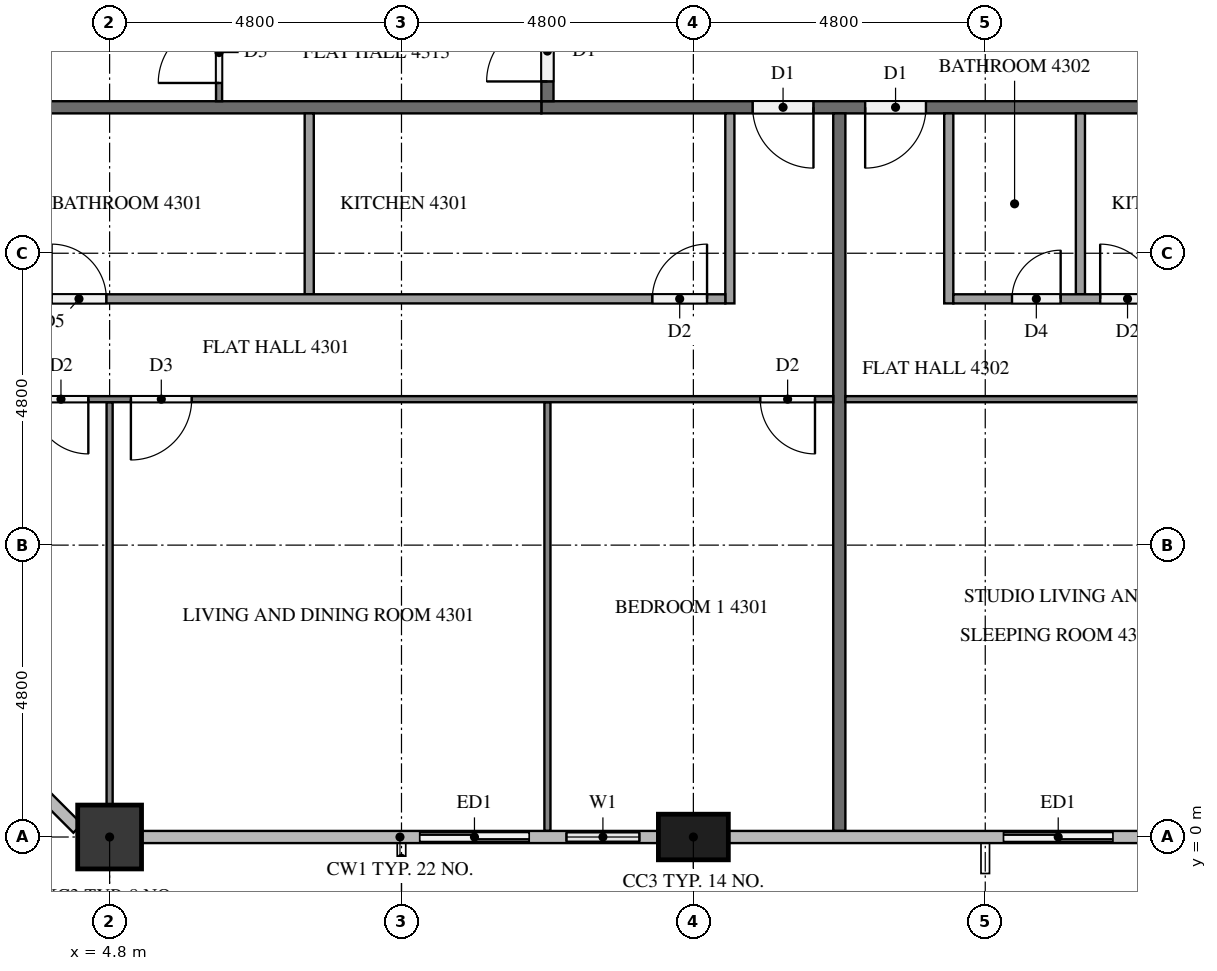
"""IFC4 building model, lengths in metres.
Left out: names, types, materials, properties, quantities, classifications, styles, units other than length and angle.
Written with IfcOpenShell. Run it as: python <this file> out.ifc"""

import sys

from ifc_helpers import new_model, si_unit, direction, frame, frame_2d, origin, origin_2d, place, context, subcontext, project, spatial, rectangle, extrude, element, fill, save


model = new_model("IFC4")
c1 = context("Model", 3, precision=1e-05, world=origin(), true_north=direction((0.0, 1.0)))
c2 = subcontext(c1, "Body", "Model", "MODEL_VIEW")
j1 = project(units=[si_unit("LENGTHUNIT", "METRE"), si_unit("PLANEANGLEUNIT", "RADIAN")], contexts=[c1])
p1 = place(None, origin())
s1 = spatial("IfcSite", under=j1, at=p1, CompositionType="ELEMENT")
p2 = place(p1, origin())
s2 = spatial("IfcBuilding", under=s1, at=p2, CompositionType="ELEMENT")
p3 = place(p2, frame((0.0, 0.0, 166.5)))
s3 = spatial("IfcBuildingStorey", under=s2, at=p3, CompositionType="ELEMENT", Elevation=166.5)
p4 = place(p3, frame((4.8, 0.0, 0.0), z_axis=(0.0, 0.0, 1.0), x_axis=(1.0, 0.0, 0.0)))
e1 = element("IfcColumn", 1, at=p4, inside=s3, PredefinedType="COLUMN", context=c2, shape_type="SweptSolid", body=[
    extrude(rectangle(XDim=1.05, YDim=1.05, at=origin_2d()), origin(), (0.0, 0.0, 1.0), 3.2),
])
p5 = place(p3, frame((14.4, 0.0, 0.0), z_axis=(0.0, 0.0, 1.0), x_axis=(1.0, 0.0, 0.0)))
e2 = element("IfcColumn", 2, at=p5, inside=s3, PredefinedType="COLUMN", context=c2, shape_type="SweptSolid", body=[
    extrude(rectangle(XDim=1.15, YDim=0.75, at=origin_2d()), origin(), (0.0, 0.0, 1.0), 3.2),
])
p6 = place(p3, frame((9.6, 0.0, 0.0), z_axis=(0.0, 0.0, 1.0), x_axis=(1.0, 0.0, 0.0)))
e3 = element("IfcWall", 3, at=p6, inside=s3, PredefinedType="SOLIDWALL", context=c2, shape_type="SweptSolid", body=[
    extrude(rectangle(XDim=4.225, YDim=0.15, at=frame_2d((2.112, 0.0))), origin(), (0.0, 0.0, 1.0), 3.2),
])
p7 = place(p6, frame((0.3, 0.0, 0.0)))
e4 = element("IfcOpeningElement", 4, at=p7, cuts=e3, PredefinedType="OPENING", context=c2, shape_type="SweptSolid", body=[
    extrude(rectangle(XDim=1.8, YDim=2.4, at=frame_2d((0.9, 1.2))), frame((0.0, 0.085, 0.0), z_axis=(0.0, -1.0, 0.0), x_axis=(1.0, 0.0, 0.0)), (0.0, 0.0, 1.0), 0.17),
])
p8 = place(p6, frame((2.712, 0.0, 0.9)))
e5 = element("IfcOpeningElement", 5, at=p8, cuts=e3, PredefinedType="OPENING", context=c2, shape_type="SweptSolid", body=[
    extrude(rectangle(XDim=1.2, YDim=1.4, at=frame_2d((0.6, 0.7))), frame((0.0, 0.085, 0.0), z_axis=(0.0, -1.0, 0.0), x_axis=(1.0, 0.0, 0.0)), (0.0, 0.0, 1.0), 0.17),
])
p9 = place(p3, frame((19.2, 0.0, 0.0), z_axis=(0.0, 0.0, 1.0), x_axis=(1.0, 0.0, 0.0)))
e6 = element("IfcWall", 6, at=p9, inside=s3, PredefinedType="SOLIDWALL", context=c2, shape_type="SweptSolid", body=[
    extrude(rectangle(XDim=2.4, YDim=0.15, at=frame_2d((1.2, 0.0))), origin(), (0.0, 0.0, 1.0), 3.2),
])
p10 = place(p9, frame((0.3, 0.0, 0.0)))
e7 = element("IfcOpeningElement", 7, at=p10, cuts=e6, PredefinedType="OPENING", context=c2, shape_type="SweptSolid", body=[
    extrude(rectangle(XDim=1.8, YDim=2.4, at=frame_2d((0.9, 1.2))), frame((0.0, 0.085, 0.0), z_axis=(0.0, -1.0, 0.0), x_axis=(1.0, 0.0, 0.0)), (0.0, 0.0, 1.0), 0.17),
])
p11 = place(p3, frame((50.5, 12.0, 0.0), z_axis=(0.0, 0.0, 1.0), x_axis=(-1.0, 0.0, 0.0)))
e8 = element("IfcWall", 8, at=p11, inside=s3, PredefinedType="PARTITIONING", context=c2, shape_type="SweptSolid", body=[
    extrude(rectangle(XDim=38.6, YDim=0.2, at=frame_2d((19.3, 0.0))), origin(), (0.0, 0.0, 1.0), 3.2),
])
p12 = place(p11, frame((34.125, 0.0, 0.0)))
e9 = element("IfcOpeningElement", 9, at=p12, cuts=e8, PredefinedType="OPENING", context=c2, shape_type="SweptSolid", body=[
    extrude(rectangle(XDim=1.0, YDim=2.1, at=frame_2d((0.5, 1.05))), frame((0.0, 0.11, 0.0), z_axis=(0.0, -1.0, 0.0), x_axis=(1.0, 0.0, 0.0)), (0.0, 0.0, 1.0), 0.22),
])
p13 = place(p11, frame((32.275, 0.0, 0.0)))
e10 = element("IfcOpeningElement", 10, at=p13, cuts=e8, PredefinedType="OPENING", context=c2, shape_type="SweptSolid", body=[
    extrude(rectangle(XDim=1.0, YDim=2.1, at=frame_2d((0.5, 1.05))), frame((0.0, 0.11, 0.0), z_axis=(0.0, -1.0, 0.0), x_axis=(1.0, 0.0, 0.0)), (0.0, 0.0, 1.0), 0.22),
])
p14 = place(p11, frame((12.525, 0.0, 0.0)))
e11 = element("IfcOpeningElement", 11, at=p14, cuts=e8, PredefinedType="OPENING", context=c2, shape_type="SweptSolid", body=[
    extrude(rectangle(XDim=1.0, YDim=2.1, at=frame_2d((0.5, 1.05))), frame((0.0, 0.11, 0.0), z_axis=(0.0, -1.0, 0.0), x_axis=(1.0, 0.0, 0.0)), (0.0, 0.0, 1.0), 0.22),
])
p15 = place(p11, frame((10.625, 0.0, 0.0)))
e12 = element("IfcOpeningElement", 12, at=p15, cuts=e8, PredefinedType="OPENING", context=c2, shape_type="SweptSolid", body=[
    extrude(rectangle(XDim=1.1, YDim=2.1, at=frame_2d((0.55, 1.05))), frame((0.0, 0.11, 0.0), z_axis=(0.0, -1.0, 0.0), x_axis=(1.0, 0.0, 0.0)), (0.0, 0.0, 1.0), 0.22),
])
p16 = place(p3, frame((12.0, 12.1, 0.0), z_axis=(0.0, 0.0, 1.0), x_axis=(0.0, 1.0, 0.0)))
e13 = element("IfcWall", 13, at=p16, inside=s3, PredefinedType="PARTITIONING", context=c2, shape_type="SweptSolid", body=[
    extrude(rectangle(XDim=28.6, YDim=0.2, at=frame_2d((14.3, 0.0))), origin(), (0.0, 0.0, 1.0), 3.2),
])
p17 = place(p16, frame((24.325, 0.0, 0.0)))
e14 = element("IfcOpeningElement", 14, at=p17, cuts=e13, PredefinedType="OPENING", context=c2, shape_type="SweptSolid", body=[
    extrude(rectangle(XDim=1.0, YDim=2.1, at=frame_2d((0.5, 1.05))), frame((0.0, 0.11, 0.0), z_axis=(0.0, -1.0, 0.0), x_axis=(1.0, 0.0, 0.0)), (0.0, 0.0, 1.0), 0.22),
])
p18 = place(p16, frame((22.475, 0.0, 0.0)))
e15 = element("IfcOpeningElement", 15, at=p18, cuts=e13, PredefinedType="OPENING", context=c2, shape_type="SweptSolid", body=[
    extrude(rectangle(XDim=1.0, YDim=2.1, at=frame_2d((0.5, 1.05))), frame((0.0, 0.11, 0.0), z_axis=(0.0, -1.0, 0.0), x_axis=(1.0, 0.0, 0.0)), (0.0, 0.0, 1.0), 0.22),
])
p19 = place(p16, frame((0.325, 0.0, 0.0)))
e16 = element("IfcOpeningElement", 16, at=p19, cuts=e13, PredefinedType="OPENING", context=c2, shape_type="SweptSolid", body=[
    extrude(rectangle(XDim=1.0, YDim=2.1, at=frame_2d((0.5, 1.05))), frame((0.0, 0.11, 0.0), z_axis=(0.0, -1.0, 0.0), x_axis=(1.0, 0.0, 0.0)), (0.0, 0.0, 1.0), 0.22),
])
for number, where, z_axis, x_axis in (
    (17, (16.8, 11.9, 0.0), (0.0, 0.0, 1.0), (0.0, -1.0, 0.0)),
    (18, (0.1, 12.0, 0.0), (0.0, 0.0, 1.0), (1.0, 0.0, 0.0)),
):
    element("IfcWall", number, at=place(p3, frame(where, z_axis=z_axis, x_axis=x_axis)), inside=s3, PredefinedType="PARTITIONING", context=c2, shape_type="SweptSolid", body=[
        extrude(rectangle(XDim=11.8, YDim=0.2, at=frame_2d((5.9, 0.0))), origin(), (0.0, 0.0, 1.0), 3.2),
    ])
p20 = place(p3, frame((12.0, 7.15, 0.0), z_axis=(0.0, 0.0, 1.0), x_axis=(0.0, -1.0, 0.0)))
e19 = element("IfcWall", 19, at=p20, inside=s3, PredefinedType="PARTITIONING", context=c2, shape_type="SweptSolid", body=[
    extrude(rectangle(XDim=7.05, YDim=0.1, at=frame_2d((3.525, 0.0))), origin(), (0.0, 0.0, 1.0), 3.2),
])
p21 = place(p3, frame((4.8, 7.15, 0.0), z_axis=(0.0, 0.0, 1.0), x_axis=(0.0, -1.0, 0.0)))
e20 = element("IfcWall", 20, at=p21, inside=s3, PredefinedType="PARTITIONING", context=c2, shape_type="SweptSolid", body=[
    extrude(rectangle(XDim=6.625, YDim=0.1, at=frame_2d((3.312, 0.0))), origin(), (0.0, 0.0, 1.0), 3.2),
])
p22 = place(p3, frame((16.7, 7.2, 0.0), z_axis=(0.0, 0.0, 1.0), x_axis=(-1.0, 0.0, 0.0)))
e21 = element("IfcWall", 21, at=p22, inside=s3, PredefinedType="PARTITIONING", context=c2, shape_type="SweptSolid", body=[
    extrude(rectangle(XDim=16.6, YDim=0.1, at=frame_2d((8.3, 0.0))), origin(), (0.0, 0.0, 1.0), 3.2),
])
p23 = place(p22, frame((0.3, 0.0, 0.0)))
e22 = element("IfcOpeningElement", 22, at=p23, cuts=e21, PredefinedType="OPENING", context=c2, shape_type="SweptSolid", body=[
    extrude(rectangle(XDim=0.9, YDim=2.1, at=frame_2d((0.45, 1.05))), frame((0.0, 0.06, 0.0), z_axis=(0.0, -1.0, 0.0), x_axis=(1.0, 0.0, 0.0)), (0.0, 0.0, 1.0), 0.12),
])
p24 = place(p22, frame((10.55, 0.0, 0.0)))
e23 = element("IfcOpeningElement", 23, at=p24, cuts=e21, PredefinedType="OPENING", context=c2, shape_type="SweptSolid", body=[
    extrude(rectangle(XDim=1.0, YDim=2.1, at=frame_2d((0.5, 1.05))), frame((0.0, 0.06, 0.0), z_axis=(0.0, -1.0, 0.0), x_axis=(1.0, 0.0, 0.0)), (0.0, 0.0, 1.0), 0.12),
])
p25 = place(p22, frame((12.25, 0.0, 0.0)))
e24 = element("IfcOpeningElement", 24, at=p25, cuts=e21, PredefinedType="OPENING", context=c2, shape_type="SweptSolid", body=[
    extrude(rectangle(XDim=0.9, YDim=2.1, at=frame_2d((0.45, 1.05))), frame((0.0, 0.06, 0.0), z_axis=(0.0, -1.0, 0.0), x_axis=(1.0, 0.0, 0.0)), (0.0, 0.0, 1.0), 0.12),
])
p26 = place(p3, frame((8.083, 11.9, 0.0), z_axis=(0.0, 0.0, 1.0), x_axis=(0.0, -1.0, 0.0)))
e25 = element("IfcWall", 25, at=p26, inside=s3, PredefinedType="PARTITIONING", context=c2, shape_type="SweptSolid", body=[
    extrude(rectangle(XDim=2.975, YDim=0.15, at=frame_2d((1.487, 0.0))), origin(), (0.0, 0.0, 1.0), 3.2),
])
p27 = place(p3, frame((15.0, 11.9, 0.0), z_axis=(0.0, 0.0, 1.0), x_axis=(0.0, -1.0, 0.0)))
e26 = element("IfcWall", 26, at=p27, inside=s3, PredefinedType="PARTITIONING", context=c2, shape_type="SweptSolid", body=[
    extrude(rectangle(XDim=3.125, YDim=0.15, at=frame_2d((1.562, 0.0))), origin(), (0.0, 0.0, 1.0), 3.2),
])
p28 = place(p3, frame((0.1, 8.85, 0.0), z_axis=(0.0, 0.0, 1.0), x_axis=(1.0, 0.0, 0.0)))
e27 = element("IfcWall", 27, at=p28, inside=s3, PredefinedType="PARTITIONING", context=c2, shape_type="SweptSolid", body=[
    extrude(rectangle(XDim=14.825, YDim=0.15, at=frame_2d((7.413, 0.0))), origin(), (0.0, 0.0, 1.0), 3.2),
])
p29 = place(p28, frame((13.625, 0.0, 0.0)))
e28 = element("IfcOpeningElement", 28, at=p29, cuts=e27, PredefinedType="OPENING", context=c2, shape_type="SweptSolid", body=[
    extrude(rectangle(XDim=0.9, YDim=2.1, at=frame_2d((0.45, 1.05))), frame((0.0, 0.085, 0.0), z_axis=(0.0, -1.0, 0.0), x_axis=(1.0, 0.0, 0.0)), (0.0, 0.0, 1.0), 0.17),
])
p30 = place(p28, frame((3.746, 0.0, 0.0)))
e29 = element("IfcOpeningElement", 29, at=p30, cuts=e27, PredefinedType="OPENING", context=c2, shape_type="SweptSolid", body=[
    extrude(rectangle(XDim=0.9, YDim=2.1, at=frame_2d((0.45, 1.05))), frame((0.0, 0.085, 0.0), z_axis=(0.0, -1.0, 0.0), x_axis=(1.0, 0.0, 0.0)), (0.0, 0.0, 1.0), 0.17),
])
p31 = place(p28, frame((2.296, 0.0, 0.0)))
e30 = element("IfcOpeningElement", 30, at=p31, cuts=e27, PredefinedType="OPENING", context=c2, shape_type="SweptSolid", body=[
    extrude(rectangle(XDim=0.8, YDim=2.1, at=frame_2d((0.4, 1.05))), frame((0.0, 0.085, 0.0), z_axis=(0.0, -1.0, 0.0), x_axis=(1.0, 0.0, 0.0)), (0.0, 0.0, 1.0), 0.17),
])
p32 = place(p3, frame((23.9, 7.2, 0.0), z_axis=(0.0, 0.0, 1.0), x_axis=(-1.0, 0.0, 0.0)))
e31 = element("IfcWall", 31, at=p32, inside=s3, PredefinedType="PARTITIONING", context=c2, shape_type="SweptSolid", body=[
    extrude(rectangle(XDim=7.0, YDim=0.1, at=frame_2d((3.5, 0.0))), origin(), (0.0, 0.0, 1.0), 3.2),
])
p33 = place(p32, frame((0.3, 0.0, 0.0)))
e32 = element("IfcOpeningElement", 32, at=p33, cuts=e31, PredefinedType="OPENING", context=c2, shape_type="SweptSolid", body=[
    extrude(rectangle(XDim=1.0, YDim=2.1, at=frame_2d((0.5, 1.05))), frame((0.0, 0.06, 0.0), z_axis=(0.0, -1.0, 0.0), x_axis=(1.0, 0.0, 0.0)), (0.0, 0.0, 1.0), 0.12),
])
p34 = place(p3, frame((20.765, 11.9, 0.0), z_axis=(0.0, 0.0, 1.0), x_axis=(0.0, -1.0, 0.0)))
e33 = element("IfcWall", 33, at=p34, inside=s3, PredefinedType="PARTITIONING", context=c2, shape_type="SweptSolid", body=[
    extrude(rectangle(XDim=2.975, YDim=0.15, at=frame_2d((1.487, 0.0))), origin(), (0.0, 0.0, 1.0), 3.2),
])
p35 = place(p3, frame((18.6, 11.9, 0.0), z_axis=(0.0, 0.0, 1.0), x_axis=(0.0, -1.0, 0.0)))
e34 = element("IfcWall", 34, at=p35, inside=s3, PredefinedType="PARTITIONING", context=c2, shape_type="SweptSolid", body=[
    extrude(rectangle(XDim=3.125, YDim=0.15, at=frame_2d((1.562, 0.0))), origin(), (0.0, 0.0, 1.0), 3.2),
])
p36 = place(p3, frame((18.675, 8.85, 0.0), z_axis=(0.0, 0.0, 1.0), x_axis=(1.0, 0.0, 0.0)))
e35 = element("IfcWall", 35, at=p36, inside=s3, PredefinedType="PARTITIONING", context=c2, shape_type="SweptSolid", body=[
    extrude(rectangle(XDim=5.225, YDim=0.15, at=frame_2d((2.612, 0.0))), origin(), (0.0, 0.0, 1.0), 3.2),
])
p37 = place(p36, frame((0.965, 0.0, 0.0)))
e36 = element("IfcOpeningElement", 36, at=p37, cuts=e35, PredefinedType="OPENING", context=c2, shape_type="SweptSolid", body=[
    extrude(rectangle(XDim=0.8, YDim=2.1, at=frame_2d((0.4, 1.05))), frame((0.0, 0.085, 0.0), z_axis=(0.0, -1.0, 0.0), x_axis=(1.0, 0.0, 0.0)), (0.0, 0.0, 1.0), 0.17),
])
p38 = place(p36, frame((2.415, 0.0, 0.0)))
e37 = element("IfcOpeningElement", 37, at=p38, cuts=e35, PredefinedType="OPENING", context=c2, shape_type="SweptSolid", body=[
    extrude(rectangle(XDim=0.9, YDim=2.1, at=frame_2d((0.45, 1.05))), frame((0.0, 0.085, 0.0), z_axis=(0.0, -1.0, 0.0), x_axis=(1.0, 0.0, 0.0)), (0.0, 0.0, 1.0), 0.17),
])
p39 = place(p3, frame((6.6, 12.1, 0.0), z_axis=(0.0, 0.0, 1.0), x_axis=(0.0, 1.0, 0.0)))
e38 = element("IfcWall", 38, at=p39, inside=s3, PredefinedType="PARTITIONING", context=c2, shape_type="SweptSolid", body=[
    extrude(rectangle(XDim=14.2, YDim=0.1, at=frame_2d((7.1, 0.0))), origin(), (0.0, 0.0, 1.0), 3.2),
])
p40 = place(p39, frame((0.3, 0.0, 0.0)))
e39 = element("IfcOpeningElement", 39, at=p40, cuts=e38, PredefinedType="OPENING", context=c2, shape_type="SweptSolid", body=[
    extrude(rectangle(XDim=1.0, YDim=2.1, at=frame_2d((0.5, 1.05))), frame((0.0, 0.06, 0.0), z_axis=(0.0, -1.0, 0.0), x_axis=(1.0, 0.0, 0.0)), (0.0, 0.0, 1.0), 0.12),
])
p41 = place(p39, frame((8.25, 0.0, 0.0)))
e40 = element("IfcOpeningElement", 40, at=p41, cuts=e38, PredefinedType="OPENING", context=c2, shape_type="SweptSolid", body=[
    extrude(rectangle(XDim=0.9, YDim=2.1, at=frame_2d((0.45, 1.05))), frame((0.0, 0.06, 0.0), z_axis=(0.0, -1.0, 0.0), x_axis=(1.0, 0.0, 0.0)), (0.0, 0.0, 1.0), 0.12),
])
p42 = place(p39, frame((9.85, 0.0, 0.0)))
e41 = element("IfcOpeningElement", 41, at=p42, cuts=e38, PredefinedType="OPENING", context=c2, shape_type="SweptSolid", body=[
    extrude(rectangle(XDim=0.9, YDim=2.1, at=frame_2d((0.45, 1.05))), frame((0.0, 0.06, 0.0), z_axis=(0.0, -1.0, 0.0), x_axis=(1.0, 0.0, 0.0)), (0.0, 0.0, 1.0), 0.12),
])
p43 = place(p7, origin())
e42 = element("IfcDoor", 42, at=p43, inside=s3, OperationType="SLIDING_TO_LEFT", PredefinedType="DOOR", context=c2, shape_type="SweptSolid", body=[
    extrude(rectangle(XDim=1.8, YDim=2.4, at=frame_2d((0.9, 1.2))), frame((0.0, 0.025, 0.0), z_axis=(0.0, -1.0, 0.0), x_axis=(1.0, 0.0, 0.0)), (0.0, 0.0, 1.0), 0.05),
])
fill(e4, e42)
p44 = place(p8, origin())
e43 = element("IfcWindow", 43, at=p44, inside=s3, PartitioningType="SINGLE_PANEL", PredefinedType="WINDOW", context=c2, shape_type="SweptSolid", body=[
    extrude(rectangle(XDim=1.2, YDim=1.4, at=frame_2d((0.6, 0.7))), frame((0.0, 0.03, 0.0), z_axis=(0.0, -1.0, 0.0), x_axis=(1.0, 0.0, 0.0)), (0.0, 0.0, 1.0), 0.06),
])
fill(e5, e43)
p45 = place(p10, origin())
e44 = element("IfcDoor", 44, at=p45, inside=s3, OperationType="SLIDING_TO_RIGHT", PredefinedType="DOOR", context=c2, shape_type="SweptSolid", body=[
    extrude(rectangle(XDim=1.8, YDim=2.4, at=frame_2d((0.9, 1.2))), frame((0.0, 0.025, 0.0), z_axis=(0.0, -1.0, 0.0), x_axis=(1.0, 0.0, 0.0)), (0.0, 0.0, 1.0), 0.05),
])
fill(e7, e44)
p46 = place(p12, origin())
e45 = element("IfcDoor", 45, at=p46, inside=s3, OperationType="SINGLE_SWING_LEFT", PredefinedType="DOOR", context=c2, shape_type="SweptSolid", body=[
    extrude(rectangle(XDim=1.0, YDim=2.1, at=frame_2d((0.5, 1.05))), frame((0.0, 0.025, 0.0), z_axis=(0.0, -1.0, 0.0), x_axis=(1.0, 0.0, 0.0)), (0.0, 0.0, 1.0), 0.05),
])
fill(e9, e45)
p47 = place(p13, origin())
e46 = element("IfcDoor", 46, at=p47, inside=s3, OperationType="SINGLE_SWING_RIGHT", PredefinedType="DOOR", context=c2, shape_type="SweptSolid", body=[
    extrude(rectangle(XDim=1.0, YDim=2.1, at=frame_2d((0.5, 1.05))), frame((0.0, 0.025, 0.0), z_axis=(0.0, -1.0, 0.0), x_axis=(1.0, 0.0, 0.0)), (0.0, 0.0, 1.0), 0.05),
])
fill(e10, e46)
p48 = place(p19, origin())
e47 = element("IfcDoor", 47, at=p48, inside=s3, OperationType="SINGLE_SWING_LEFT", PredefinedType="DOOR", context=c2, shape_type="SweptSolid", body=[
    extrude(rectangle(XDim=1.0, YDim=2.1, at=frame_2d((0.5, 1.05))), frame((0.0, 0.025, 0.0), z_axis=(0.0, -1.0, 0.0), x_axis=(1.0, 0.0, 0.0)), (0.0, 0.0, 1.0), 0.05),
])
fill(e16, e47)
p49 = place(p23, origin())
e48 = element("IfcDoor", 48, at=p49, inside=s3, OperationType="SINGLE_SWING_LEFT", PredefinedType="DOOR", context=c2, shape_type="SweptSolid", body=[
    extrude(rectangle(XDim=0.9, YDim=2.1, at=frame_2d((0.45, 1.05))), frame((0.0, 0.025, 0.0), z_axis=(0.0, -1.0, 0.0), x_axis=(1.0, 0.0, 0.0)), (0.0, 0.0, 1.0), 0.05),
])
fill(e22, e48)
p50 = place(p24, origin())
e49 = element("IfcDoor", 49, at=p50, inside=s3, OperationType="SINGLE_SWING_RIGHT", PredefinedType="DOOR", context=c2, shape_type="SweptSolid", body=[
    extrude(rectangle(XDim=1.0, YDim=2.1, at=frame_2d((0.5, 1.05))), frame((0.0, 0.025, 0.0), z_axis=(0.0, -1.0, 0.0), x_axis=(1.0, 0.0, 0.0)), (0.0, 0.0, 1.0), 0.05),
])
fill(e23, e49)
p51 = place(p25, origin())
e50 = element("IfcDoor", 50, at=p51, inside=s3, OperationType="SINGLE_SWING_LEFT", PredefinedType="DOOR", context=c2, shape_type="SweptSolid", body=[
    extrude(rectangle(XDim=0.9, YDim=2.1, at=frame_2d((0.45, 1.05))), frame((0.0, 0.025, 0.0), z_axis=(0.0, -1.0, 0.0), x_axis=(1.0, 0.0, 0.0)), (0.0, 0.0, 1.0), 0.05),
])
fill(e24, e50)
p52 = place(p29, origin())
e51 = element("IfcDoor", 51, at=p52, inside=s3, OperationType="SINGLE_SWING_RIGHT", PredefinedType="DOOR", context=c2, shape_type="SweptSolid", body=[
    extrude(rectangle(XDim=0.9, YDim=2.1, at=frame_2d((0.45, 1.05))), frame((0.0, 0.025, 0.0), z_axis=(0.0, -1.0, 0.0), x_axis=(1.0, 0.0, 0.0)), (0.0, 0.0, 1.0), 0.05),
])
fill(e28, e51)
p53 = place(p30, origin())
e52 = element("IfcDoor", 52, at=p53, inside=s3, OperationType="SINGLE_SWING_LEFT", PredefinedType="DOOR", context=c2, shape_type="SweptSolid", body=[
    extrude(rectangle(XDim=0.9, YDim=2.1, at=frame_2d((0.45, 1.05))), frame((0.0, 0.025, 0.0), z_axis=(0.0, -1.0, 0.0), x_axis=(1.0, 0.0, 0.0)), (0.0, 0.0, 1.0), 0.05),
])
fill(e29, e52)
p54 = place(p37, origin())
e53 = element("IfcDoor", 53, at=p54, inside=s3, OperationType="SINGLE_SWING_RIGHT", PredefinedType="DOOR", context=c2, shape_type="SweptSolid", body=[
    extrude(rectangle(XDim=0.8, YDim=2.1, at=frame_2d((0.4, 1.05))), frame((0.0, 0.025, 0.0), z_axis=(0.0, -1.0, 0.0), x_axis=(1.0, 0.0, 0.0)), (0.0, 0.0, 1.0), 0.05),
])
fill(e36, e53)
p55 = place(p38, origin())
e54 = element("IfcDoor", 54, at=p55, inside=s3, OperationType="SINGLE_SWING_LEFT", PredefinedType="DOOR", context=c2, shape_type="SweptSolid", body=[
    extrude(rectangle(XDim=0.9, YDim=2.1, at=frame_2d((0.45, 1.05))), frame((0.0, 0.025, 0.0), z_axis=(0.0, -1.0, 0.0), x_axis=(1.0, 0.0, 0.0)), (0.0, 0.0, 1.0), 0.05),
])
fill(e37, e54)
p56 = place(p40, origin())
e55 = element("IfcDoor", 55, at=p56, inside=s3, OperationType="SINGLE_SWING_LEFT", PredefinedType="DOOR", context=c2, shape_type="SweptSolid", body=[
    extrude(rectangle(XDim=1.0, YDim=2.1, at=frame_2d((0.5, 1.05))), frame((0.0, 0.025, 0.0), z_axis=(0.0, -1.0, 0.0), x_axis=(1.0, 0.0, 0.0)), (0.0, 0.0, 1.0), 0.05),
])
fill(e39, e55)
save(model, sys.argv[1])
